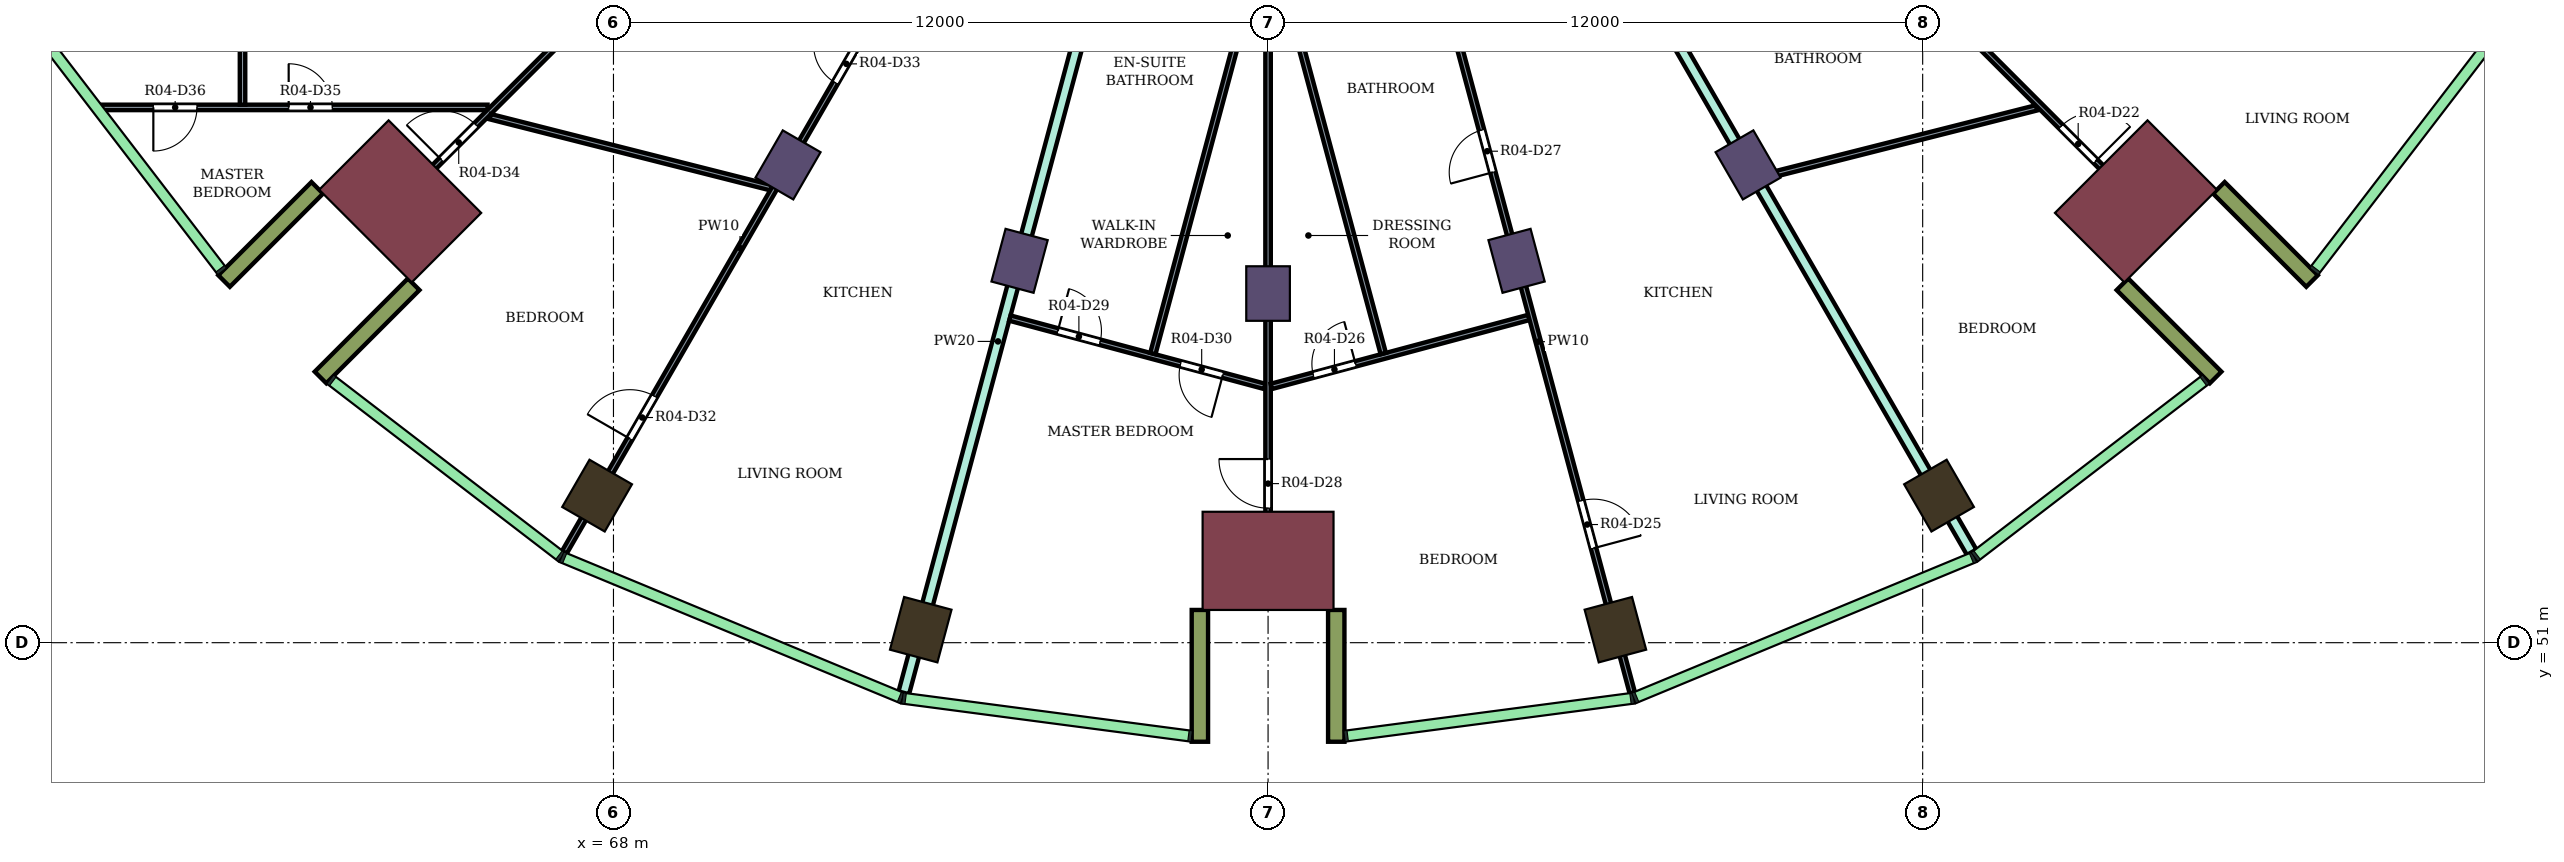
"""IFC4 building model, lengths in metres.
Left out: names, types, materials, properties, quantities, classifications, styles, units other than length and angle.
Written with IfcOpenShell. Run it as: python <this file> out.ifc"""

import sys

from ifc_helpers import new_model, si_unit, direction, frame, frame_2d, origin, origin_2d, place, context, subcontext, project, spatial, rectangle, extrude, element, fill, save


model = new_model("IFC4")
c1 = context("Model", 3, precision=1e-05, world=origin(), true_north=direction((0.0, 1.0)))
c2 = subcontext(c1, "Body", "Model", "MODEL_VIEW")
j1 = project(units=[si_unit("LENGTHUNIT", "METRE"), si_unit("PLANEANGLEUNIT", "RADIAN")], contexts=[c1])
p1 = place(None, origin())
s1 = spatial("IfcSite", under=j1, at=p1, CompositionType="ELEMENT")
p2 = place(p1, origin())
s2 = spatial("IfcBuilding", under=s1, at=p2, CompositionType="ELEMENT")
p3 = place(p2, frame((0.0, 0.0, 198.7)))
s3 = spatial("IfcBuildingStorey", under=s2, at=p3, CompositionType="ELEMENT", Elevation=198.7)
for number, where, z_axis, x_axis in (
    (1, (67.7, 53.696, 0.0), (0.0, 0.0, 1.0), (-0.5, -0.866, 0.0)),
    (2, (73.633, 51.238, 0.0), (0.0, 0.0, 1.0), (-0.259, -0.966, 0.0)),
    (3, (86.367, 51.238, 0.0), (0.0, 0.0, 1.0), (0.259, -0.966, 0.0)),
    (4, (92.3, 53.696, 0.0), (0.0, 0.0, 1.0), (0.5, -0.866, 0.0)),
):
    element("IfcColumn", number, at=place(p3, frame(where, z_axis=z_axis, x_axis=x_axis)), inside=s3, PredefinedType="COLUMN", context=c2, shape_type="SweptSolid", body=[
        extrude(rectangle(XDim=1.0, YDim=0.9, at=origin_2d()), origin(), (0.0, 0.0, 1.0), 4.1),
    ])
for number, where, z_axis, x_axis in (
    (5, (71.2, 59.758, 0.0), (0.0, 0.0, 1.0), (-0.5, -0.866, 0.0)),
    (6, (75.445, 58.0, 0.0), (0.0, 0.0, 1.0), (-0.259, -0.966, 0.0)),
    (7, (80.0, 57.4, 0.0), (0.0, 0.0, 1.0), (0.0, -1.0, 0.0)),
    (8, (84.555, 58.0, 0.0), (0.0, 0.0, 1.0), (0.259, -0.966, 0.0)),
    (9, (88.8, 59.758, 0.0), (0.0, 0.0, 1.0), (0.5, -0.866, 0.0)),
):
    element("IfcColumn", number, at=place(p3, frame(where, z_axis=z_axis, x_axis=x_axis)), inside=s3, PredefinedType="COLUMN", context=c2, shape_type="SweptSolid", body=[
        extrude(rectangle(XDim=1.0, YDim=0.8, at=origin_2d()), origin(), (0.0, 0.0, 1.0), 4.1),
    ])
for number, where, z_axis, x_axis in (
    (10, (64.09, 59.09, 0.0), (0.0, 0.0, 1.0), (-0.707, -0.707, 0.0)),
    (11, (80.0, 52.5, 0.0), (0.0, 0.0, 1.0), (0.0, -1.0, 0.0)),
    (12, (95.91, 59.09, 0.0), (0.0, 0.0, 1.0), (0.707, -0.707, 0.0)),
):
    element("IfcColumn", number, at=place(p3, frame(where, z_axis=z_axis, x_axis=x_axis)), inside=s3, PredefinedType="COLUMN", context=c2, shape_type="SweptSolid", body=[
        extrude(rectangle(XDim=1.8, YDim=2.4, at=origin_2d()), origin(), (0.0, 0.0, 1.0), 4.1),
    ])
for number, where, z_axis, x_axis in (
    (13, (62.57, 59.338, 0.0), (0.0, 0.0, 1.0), (-0.707, -0.707, 0.0)),
    (14, (64.338, 57.57, 0.0), (0.0, 0.0, 1.0), (-0.707, -0.707, 0.0)),
    (15, (78.75, 51.6, 0.0), (0.0, 0.0, 1.0), (0.0, -1.0, 0.0)),
    (16, (81.25, 51.6, 0.0), (0.0, 0.0, 1.0), (0.0, -1.0, 0.0)),
    (17, (95.662, 57.57, 0.0), (0.0, 0.0, 1.0), (0.707, -0.707, 0.0)),
    (18, (97.43, 59.338, 0.0), (0.0, 0.0, 1.0), (0.707, -0.707, 0.0)),
):
    element("IfcWall", number, at=place(p3, frame(where, z_axis=z_axis, x_axis=x_axis)), inside=s3, PredefinedType="NOTDEFINED", context=c2, shape_type="SweptSolid", body=[
        extrude(rectangle(XDim=2.416, YDim=0.3, at=frame_2d((1.208, 0.0))), origin(), (0.0, 0.0, 1.0), 4.1),
    ])
p4 = place(p3, frame((73.323, 50.081, 0.0), z_axis=(0.0, 0.0, 1.0), x_axis=(0.258888262922, 0.965907276772, 0.0)))
e19 = element("IfcWall", 19, at=p4, inside=s3, PredefinedType="PARTITIONING", context=c2, shape_type="SweptSolid", body=[
    extrude(rectangle(XDim=13.338, YDim=0.2, at=frame_2d((6.669, 0.0))), origin(), (0.0, 0.0, 1.0), 3.65),
])
p5 = place(p3, frame((86.466, 63.801, 0.0), z_axis=(0.0, 0.0, 1.0), x_axis=(0.499937082171, -0.866061726362, 0.0)))
e20 = element("IfcWall", 20, at=p5, inside=s3, PredefinedType="PARTITIONING", context=c2, shape_type="SweptSolid", body=[
    extrude(rectangle(XDim=12.866, YDim=0.2, at=frame_2d((6.433, 0.0))), origin(), (0.0, 0.0, 1.0), 3.65),
])
p6 = place(p3, frame((58.6, 60.812, 0.0), z_axis=(0.0, 0.0, 1.0), x_axis=(1.0, 0.0, 0.0)))
e21 = element("IfcWall", 21, at=p6, inside=s3, PredefinedType="PARTITIONING", context=c2, shape_type="SweptSolid", body=[
    extrude(rectangle(XDim=7.092, YDim=0.1, at=frame_2d((3.546, 0.0))), origin(), (0.0, 0.0, 1.0), 3.65),
])
p7 = place(p6, frame((3.446, 0.0, 0.0)))
e22 = element("IfcOpeningElement", 22, at=p7, cuts=e21, PredefinedType="OPENING", context=c2, shape_type="SweptSolid", body=[
    extrude(rectangle(XDim=0.8, YDim=2.1, at=frame_2d((0.4, 1.05))), frame((0.0, 0.06, 0.0), z_axis=(0.0, -1.0, 0.0), x_axis=(1.0, 0.0, 0.0)), (0.0, 0.0, 1.0), 0.12),
])
p8 = place(p6, frame((0.965, 0.0, 0.0)))
e23 = element("IfcOpeningElement", 23, at=p8, cuts=e21, PredefinedType="OPENING", context=c2, shape_type="SweptSolid", body=[
    extrude(rectangle(XDim=0.8, YDim=2.1, at=frame_2d((0.4, 1.05))), frame((0.0, 0.06, 0.0), z_axis=(0.0, -1.0, 0.0), x_axis=(1.0, 0.0, 0.0)), (0.0, 0.0, 1.0), 0.12),
])
p9 = place(p3, frame((61.2, 60.862, 0.0), z_axis=(0.0, 0.0, 1.0), x_axis=(0.0, 1.0, 0.0)))
e24 = element("IfcWall", 24, at=p9, inside=s3, PredefinedType="PARTITIONING", context=c2, shape_type="SweptSolid", body=[
    extrude(rectangle(XDim=3.283, YDim=0.1, at=frame_2d((1.642, 0.0))), origin(), (0.0, 0.0, 1.0), 3.65),
])
p10 = place(p3, frame((63.592, 58.6, 0.0), z_axis=(0.0, 0.0, 1.0), x_axis=(0.707260766325, 0.706952762508, 0.0)))
e25 = element("IfcWall", 25, at=p10, inside=s3, PredefinedType="PARTITIONING", context=c2, shape_type="SweptSolid", body=[
    extrude(rectangle(XDim=8.719, YDim=0.1, at=frame_2d((4.36, 0.0))), origin(), (0.0, 0.0, 1.0), 3.65),
])
p11 = place(p10, frame((1.772, 0.0, 0.0)))
e26 = element("IfcOpeningElement", 26, at=p11, cuts=e25, PredefinedType="OPENING", context=c2, shape_type="SweptSolid", body=[
    extrude(rectangle(XDim=0.9, YDim=2.1, at=frame_2d((0.45, 1.05))), frame((0.0, 0.06, 0.0), z_axis=(0.0, -1.0, 0.0), x_axis=(1.0, 0.0, 0.0)), (0.0, 0.0, 1.0), 0.12),
])
p12 = place(p3, frame((65.74, 60.642, 0.0), z_axis=(0.0, 0.0, 1.0), x_axis=(0.969435742918, -0.245345349156, 0.0)))
e27 = element("IfcWall", 27, at=p12, inside=s3, PredefinedType="PARTITIONING", context=c2, shape_type="SweptSolid", body=[
    extrude(rectangle(XDim=5.314, YDim=0.1, at=frame_2d((2.657, 0.0))), origin(), (0.0, 0.0, 1.0), 3.65),
])
p13 = place(p3, frame((67.101, 52.659, 0.0), z_axis=(0.0, 0.0, 1.0), x_axis=(0.500035926033, 0.866004660886, 0.0)))
e28 = element("IfcWall", 28, at=p13, inside=s3, PredefinedType="PARTITIONING", context=c2, shape_type="SweptSolid", body=[
    extrude(rectangle(XDim=12.876, YDim=0.1, at=frame_2d((6.438, 0.0))), origin(), (0.0, 0.0, 1.0), 3.65),
])
p14 = place(p13, frame((2.401, 0.0, 0.0)))
e29 = element("IfcOpeningElement", 29, at=p14, cuts=e28, PredefinedType="OPENING", context=c2, shape_type="SweptSolid", body=[
    extrude(rectangle(XDim=0.9, YDim=2.1, at=frame_2d((0.45, 1.05))), frame((0.0, 0.06, 0.0), z_axis=(0.0, -1.0, 0.0), x_axis=(1.0, 0.0, 0.0)), (0.0, 0.0, 1.0), 0.12),
])
p15 = place(p13, frame((9.936, 0.0, 0.0)))
e30 = element("IfcOpeningElement", 30, at=p15, cuts=e28, PredefinedType="OPENING", context=c2, shape_type="SweptSolid", body=[
    extrude(rectangle(XDim=0.8, YDim=2.1, at=frame_2d((0.4, 1.05))), frame((0.0, 0.06, 0.0), z_axis=(0.0, -1.0, 0.0), x_axis=(1.0, 0.0, 0.0)), (0.0, 0.0, 1.0), 0.12),
])
p16 = place(p3, frame((75.267, 56.95, 0.0), z_axis=(0.0, 0.0, 1.0), x_axis=(0.965900084933, -0.25891509405, 0.0)))
e31 = element("IfcWall", 31, at=p16, inside=s3, PredefinedType="PARTITIONING", context=c2, shape_type="SweptSolid", body=[
    extrude(rectangle(XDim=4.84, YDim=0.1, at=frame_2d((2.42, 0.0))), origin(), (0.0, 0.0, 1.0), 3.65),
])
p17 = place(p16, frame((0.91, 0.0, 0.0)))
e32 = element("IfcOpeningElement", 32, at=p17, cuts=e31, PredefinedType="OPENING", context=c2, shape_type="SweptSolid", body=[
    extrude(rectangle(XDim=0.8, YDim=2.1, at=frame_2d((0.4, 1.05))), frame((0.0, 0.06, 0.0), z_axis=(0.0, -1.0, 0.0), x_axis=(1.0, 0.0, 0.0)), (0.0, 0.0, 1.0), 0.12),
])
p18 = place(p16, frame((3.24, 0.0, 0.0)))
e33 = element("IfcOpeningElement", 33, at=p18, cuts=e31, PredefinedType="OPENING", context=c2, shape_type="SweptSolid", body=[
    extrude(rectangle(XDim=0.8, YDim=2.1, at=frame_2d((0.4, 1.05))), frame((0.0, 0.06, 0.0), z_axis=(0.0, -1.0, 0.0), x_axis=(1.0, 0.0, 0.0)), (0.0, 0.0, 1.0), 0.12),
])
p19 = place(p3, frame((77.888, 56.3, 0.0), z_axis=(0.0, 0.0, 1.0), x_axis=(0.258885575383, 0.965907997098, 0.0)))
e34 = element("IfcWall", 34, at=p19, inside=s3, PredefinedType="PARTITIONING", context=c2, shape_type="SweptSolid", body=[
    extrude(rectangle(XDim=6.15, YDim=0.1, at=frame_2d((3.075, 0.0))), origin(), (0.0, 0.0, 1.0), 3.65),
])
p20 = place(p3, frame((80.0, 51.8, 0.0), z_axis=(0.0, 0.0, 1.0), x_axis=(0.0, 1.0, 0.0)))
e35 = element("IfcWall", 35, at=p20, inside=s3, PredefinedType="PARTITIONING", context=c2, shape_type="SweptSolid", body=[
    extrude(rectangle(XDim=10.404, YDim=0.1, at=frame_2d((5.202, 0.0))), origin(), (0.0, 0.0, 1.0), 3.65),
])
p21 = place(p20, frame((1.666, 0.0, 0.0)))
e36 = element("IfcOpeningElement", 36, at=p21, cuts=e35, PredefinedType="OPENING", context=c2, shape_type="SweptSolid", body=[
    extrude(rectangle(XDim=0.9, YDim=2.1, at=frame_2d((0.45, 1.05))), frame((0.0, 0.06, 0.0), z_axis=(0.0, -1.0, 0.0), x_axis=(1.0, 0.0, 0.0)), (0.0, 0.0, 1.0), 0.12),
])
p22 = place(p3, frame((80.058, 55.698, 0.0), z_axis=(0.0, 0.0, 1.0), x_axis=(0.965970105839, 0.258653734992, 0.0)))
e37 = element("IfcWall", 37, at=p22, inside=s3, PredefinedType="PARTITIONING", context=c2, shape_type="SweptSolid", body=[
    extrude(rectangle(XDim=4.89, YDim=0.1, at=frame_2d((2.445, 0.0))), origin(), (0.0, 0.0, 1.0), 3.65),
])
p23 = place(p22, frame((0.8, 0.0, 0.0)))
e38 = element("IfcOpeningElement", 38, at=p23, cuts=e37, PredefinedType="OPENING", context=c2, shape_type="SweptSolid", body=[
    extrude(rectangle(XDim=0.8, YDim=2.1, at=frame_2d((0.4, 1.05))), frame((0.0, 0.06, 0.0), z_axis=(0.0, -1.0, 0.0), x_axis=(1.0, 0.0, 0.0)), (0.0, 0.0, 1.0), 0.12),
])
p24 = place(p3, frame((80.52, 62.24, 0.0), z_axis=(0.0, 0.0, 1.0), x_axis=(0.258885575383, -0.965907997098, 0.0)))
e39 = element("IfcWall", 39, at=p24, inside=s3, PredefinedType="PARTITIONING", context=c2, shape_type="SweptSolid", body=[
    extrude(rectangle(XDim=6.15, YDim=0.1, at=frame_2d((3.075, 0.0))), origin(), (0.0, 0.0, 1.0), 3.65),
])
p25 = place(p3, frame((83.228, 62.955, 0.0), z_axis=(0.0, 0.0, 1.0), x_axis=(0.258737611245, -0.965947642746, 0.0)))
e40 = element("IfcWall", 40, at=p25, inside=s3, PredefinedType="PARTITIONING", context=c2, shape_type="SweptSolid", body=[
    extrude(rectangle(XDim=13.328, YDim=0.1, at=frame_2d((6.664, 0.0))), origin(), (0.0, 0.0, 1.0), 3.65),
])
p26 = place(p25, frame((9.684, 0.0, 0.0)))
e41 = element("IfcOpeningElement", 41, at=p26, cuts=e40, PredefinedType="OPENING", context=c2, shape_type="SweptSolid", body=[
    extrude(rectangle(XDim=0.9, YDim=2.1, at=frame_2d((0.45, 1.05))), frame((0.0, 0.06, 0.0), z_axis=(0.0, -1.0, 0.0), x_axis=(1.0, 0.0, 0.0)), (0.0, 0.0, 1.0), 0.12),
])
p27 = place(p25, frame((2.65, 0.0, 0.0)))
e42 = element("IfcOpeningElement", 42, at=p27, cuts=e40, PredefinedType="OPENING", context=c2, shape_type="SweptSolid", body=[
    extrude(rectangle(XDim=0.8, YDim=2.1, at=frame_2d((0.4, 1.05))), frame((0.0, 0.06, 0.0), z_axis=(0.0, -1.0, 0.0), x_axis=(1.0, 0.0, 0.0)), (0.0, 0.0, 1.0), 0.12),
])
p28 = place(p3, frame((89.054, 59.531, 0.0), z_axis=(0.0, 0.0, 1.0), x_axis=(0.969472150829, 0.245201445279, 0.0)))
e43 = element("IfcWall", 43, at=p28, inside=s3, PredefinedType="PARTITIONING", context=c2, shape_type="SweptSolid", body=[
    extrude(rectangle(XDim=5.191, YDim=0.1, at=frame_2d((2.596, 0.0))), origin(), (0.0, 0.0, 1.0), 3.65),
])
p29 = place(p3, frame((90.236, 64.758, 0.0), z_axis=(0.0, 0.0, 1.0), x_axis=(0.706952774706, -0.707260754132, 0.0)))
e44 = element("IfcWall", 44, at=p29, inside=s3, PredefinedType="PARTITIONING", context=c2, shape_type="SweptSolid", body=[
    extrude(rectangle(XDim=8.72, YDim=0.1, at=frame_2d((4.36, 0.0))), origin(), (0.0, 0.0, 1.0), 3.65),
])
p30 = place(p29, frame((6.077, 0.0, 0.0)))
e45 = element("IfcOpeningElement", 45, at=p30, cuts=e44, PredefinedType="OPENING", context=c2, shape_type="SweptSolid", body=[
    extrude(rectangle(XDim=0.9, YDim=2.1, at=frame_2d((0.45, 1.05))), frame((0.0, 0.06, 0.0), z_axis=(0.0, -1.0, 0.0), x_axis=(1.0, 0.0, 0.0)), (0.0, 0.0, 1.0), 0.12),
])
p31 = place(p29, frame((1.722, 0.0, 0.0)))
e46 = element("IfcOpeningElement", 46, at=p31, cuts=e44, PredefinedType="OPENING", context=c2, shape_type="SweptSolid", body=[
    extrude(rectangle(XDim=0.8, YDim=2.1, at=frame_2d((0.4, 1.05))), frame((0.0, 0.06, 0.0), z_axis=(0.0, -1.0, 0.0), x_axis=(1.0, 0.0, 0.0)), (0.0, 0.0, 1.0), 0.12),
])
p32 = place(p30, origin())
e47 = element("IfcDoor", 47, at=p32, inside=s3, OperationType="SINGLE_SWING_RIGHT", PredefinedType="DOOR", context=c2, shape_type="SweptSolid", body=[
    extrude(rectangle(XDim=0.9, YDim=2.1, at=frame_2d((0.45, 1.05))), frame((0.0, 0.025, 0.0), z_axis=(0.0, -1.0, 0.0), x_axis=(1.0, 0.0, 0.0)), (0.0, 0.0, 1.0), 0.05),
])
fill(e45, e47)
p33 = place(p26, origin())
e48 = element("IfcDoor", 48, at=p33, inside=s3, OperationType="SINGLE_SWING_RIGHT", PredefinedType="DOOR", context=c2, shape_type="SweptSolid", body=[
    extrude(rectangle(XDim=0.9, YDim=2.1, at=frame_2d((0.45, 1.05))), frame((0.0, 0.025, 0.0), z_axis=(0.0, -1.0, 0.0), x_axis=(1.0, 0.0, 0.0)), (0.0, 0.0, 1.0), 0.05),
])
fill(e41, e48)
p34 = place(p23, origin())
e49 = element("IfcDoor", 49, at=p34, inside=s3, OperationType="SINGLE_SWING_RIGHT", PredefinedType="DOOR", context=c2, shape_type="SweptSolid", body=[
    extrude(rectangle(XDim=0.8, YDim=2.1, at=frame_2d((0.4, 1.05))), frame((0.0, 0.025, 0.0), z_axis=(0.0, -1.0, 0.0), x_axis=(1.0, 0.0, 0.0)), (0.0, 0.0, 1.0), 0.05),
])
fill(e38, e49)
p35 = place(p27, frame((0.8, 0.0, 0.0), z_axis=(0.0, 0.0, 1.0), x_axis=(-1.0, 0.0, 0.0)))
e50 = element("IfcDoor", 50, at=p35, inside=s3, OperationType="SINGLE_SWING_LEFT", PredefinedType="DOOR", context=c2, shape_type="SweptSolid", body=[
    extrude(rectangle(XDim=0.8, YDim=2.1, at=frame_2d((0.4, 1.05))), frame((0.0, 0.025, 0.0), z_axis=(0.0, -1.0, 0.0), x_axis=(1.0, 0.0, 0.0)), (0.0, 0.0, 1.0), 0.05),
])
fill(e42, e50)
p36 = place(p21, origin())
e51 = element("IfcDoor", 51, at=p36, inside=s3, OperationType="SINGLE_SWING_RIGHT", PredefinedType="DOOR", context=c2, shape_type="SweptSolid", body=[
    extrude(rectangle(XDim=0.9, YDim=2.1, at=frame_2d((0.45, 1.05))), frame((0.0, 0.025, 0.0), z_axis=(0.0, -1.0, 0.0), x_axis=(1.0, 0.0, 0.0)), (0.0, 0.0, 1.0), 0.05),
])
fill(e36, e51)
p37 = place(p17, origin())
e52 = element("IfcDoor", 52, at=p37, inside=s3, OperationType="SINGLE_SWING_LEFT", PredefinedType="DOOR", context=c2, shape_type="SweptSolid", body=[
    extrude(rectangle(XDim=0.8, YDim=2.1, at=frame_2d((0.4, 1.05))), frame((0.0, 0.025, 0.0), z_axis=(0.0, -1.0, 0.0), x_axis=(1.0, 0.0, 0.0)), (0.0, 0.0, 1.0), 0.05),
])
fill(e32, e52)
p38 = place(p18, frame((0.8, 0.0, 0.0), z_axis=(0.0, 0.0, 1.0), x_axis=(-1.0, 0.0, 0.0)))
e53 = element("IfcDoor", 53, at=p38, inside=s3, OperationType="SINGLE_SWING_LEFT", PredefinedType="DOOR", context=c2, shape_type="SweptSolid", body=[
    extrude(rectangle(XDim=0.8, YDim=2.1, at=frame_2d((0.4, 1.05))), frame((0.0, 0.025, 0.0), z_axis=(0.0, -1.0, 0.0), x_axis=(1.0, 0.0, 0.0)), (0.0, 0.0, 1.0), 0.05),
])
fill(e33, e53)
p39 = place(p14, origin())
e54 = element("IfcDoor", 54, at=p39, inside=s3, OperationType="SINGLE_SWING_LEFT", PredefinedType="DOOR", context=c2, shape_type="SweptSolid", body=[
    extrude(rectangle(XDim=0.9, YDim=2.1, at=frame_2d((0.45, 1.05))), frame((0.0, 0.025, 0.0), z_axis=(0.0, -1.0, 0.0), x_axis=(1.0, 0.0, 0.0)), (0.0, 0.0, 1.0), 0.05),
])
fill(e29, e54)
p40 = place(p15, origin())
e55 = element("IfcDoor", 55, at=p40, inside=s3, OperationType="SINGLE_SWING_RIGHT", PredefinedType="DOOR", context=c2, shape_type="SweptSolid", body=[
    extrude(rectangle(XDim=0.8, YDim=2.1, at=frame_2d((0.4, 1.05))), frame((0.0, 0.025, 0.0), z_axis=(0.0, -1.0, 0.0), x_axis=(1.0, 0.0, 0.0)), (0.0, 0.0, 1.0), 0.05),
])
fill(e30, e55)
p41 = place(p11, origin())
e56 = element("IfcDoor", 56, at=p41, inside=s3, OperationType="SINGLE_SWING_LEFT", PredefinedType="DOOR", context=c2, shape_type="SweptSolid", body=[
    extrude(rectangle(XDim=0.9, YDim=2.1, at=frame_2d((0.45, 1.05))), frame((0.0, 0.025, 0.0), z_axis=(0.0, -1.0, 0.0), x_axis=(1.0, 0.0, 0.0)), (0.0, 0.0, 1.0), 0.05),
])
fill(e26, e56)
p42 = place(p7, origin())
e57 = element("IfcDoor", 57, at=p42, inside=s3, OperationType="SINGLE_SWING_LEFT", PredefinedType="DOOR", context=c2, shape_type="SweptSolid", body=[
    extrude(rectangle(XDim=0.8, YDim=2.1, at=frame_2d((0.4, 1.05))), frame((0.0, 0.025, 0.0), z_axis=(0.0, -1.0, 0.0), x_axis=(1.0, 0.0, 0.0)), (0.0, 0.0, 1.0), 0.05),
])
fill(e22, e57)
p43 = place(p8, frame((0.8, 0.0, 0.0), z_axis=(0.0, 0.0, 1.0), x_axis=(-1.0, 0.0, 0.0)))
e58 = element("IfcDoor", 58, at=p43, inside=s3, OperationType="SINGLE_SWING_RIGHT", PredefinedType="DOOR", context=c2, shape_type="SweptSolid", body=[
    extrude(rectangle(XDim=0.8, YDim=2.1, at=frame_2d((0.4, 1.05))), frame((0.0, 0.025, 0.0), z_axis=(0.0, -1.0, 0.0), x_axis=(1.0, 0.0, 0.0)), (0.0, 0.0, 1.0), 0.05),
])
fill(e23, e58)
save(model, sys.argv[1])
